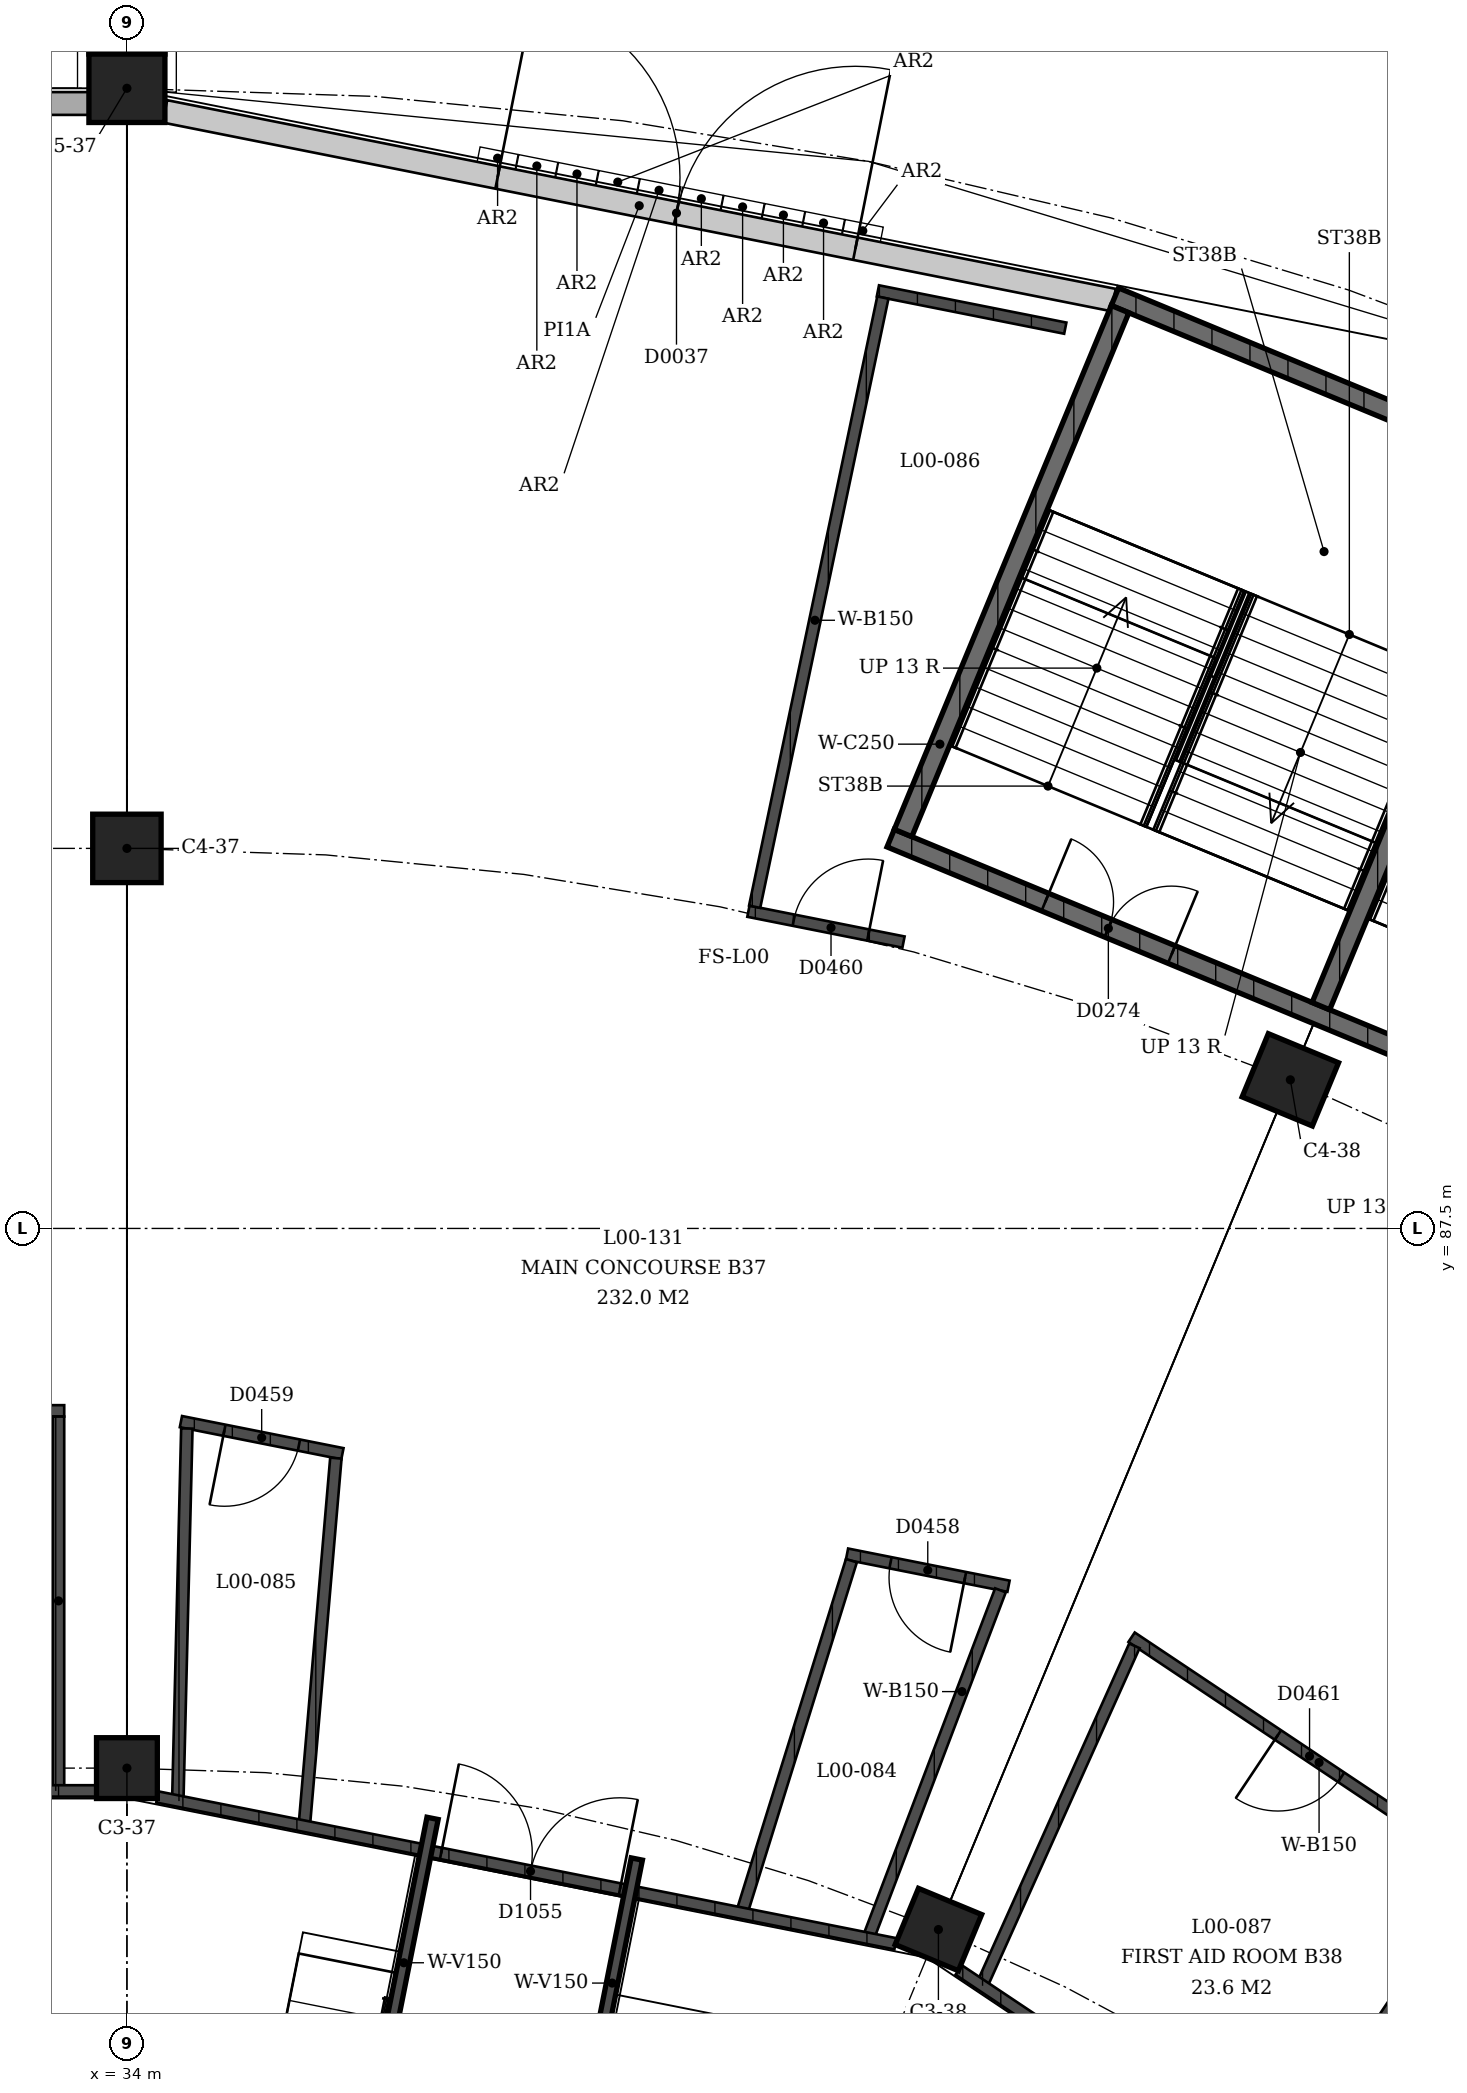
"""IFC4 building model, lengths in metres.
Left out: names, types, materials, properties, quantities, classifications, styles, units other than length and angle.
Written with IfcOpenShell. Run it as: python <this file> out.ifc"""

import sys

from ifc_helpers import new_model, si_unit, direction, frame, frame_2d, origin, origin_2d, place, context, subcontext, project, spatial, rectangle, extrude, element, fill, save


model = new_model("IFC4")
c1 = context("Model", 3, precision=1e-05, world=origin(), true_north=direction((0.0, 1.0)))
c2 = subcontext(c1, "Body", "Model", "MODEL_VIEW")
j1 = project(units=[si_unit("LENGTHUNIT", "METRE"), si_unit("PLANEANGLEUNIT", "RADIAN")], contexts=[c1])
p1 = place(None, origin())
s1 = spatial("IfcSite", under=j1, at=p1, CompositionType="ELEMENT")
p2 = place(p1, origin())
s2 = spatial("IfcBuilding", under=s1, at=p2, CompositionType="ELEMENT")
p3 = place(p2, origin())
s3 = spatial("IfcBuildingStorey", under=s2, at=p3, CompositionType="ELEMENT", Elevation=0.0)
p4 = place(p3, frame((34.0, 80.4, 0.0), z_axis=(0.0, 0.0, 1.0), x_axis=(-1.0, 0.0, 0.0)))
e1 = element("IfcColumn", 1, at=p4, inside=s3, PredefinedType="COLUMN", context=c2, shape_type="SweptSolid", body=[
    extrude(rectangle(XDim=0.8, YDim=0.8, at=origin_2d()), origin(), (0.0, 0.0, 1.0), 4.5),
])
p5 = place(p3, frame((34.0, 92.5, 0.0), z_axis=(0.0, 0.0, 1.0), x_axis=(-1.0, 0.0, 0.0)))
e2 = element("IfcColumn", 2, at=p5, inside=s3, PredefinedType="COLUMN", context=c2, shape_type="SweptSolid", body=[
    extrude(rectangle(XDim=0.9, YDim=0.9, at=origin_2d()), origin(), (0.0, 0.0, 1.0), 4.5),
])
p6 = place(p3, frame((34.0, 102.5, 0.0), z_axis=(0.0, 0.0, 1.0), x_axis=(-1.0, 0.0, 0.0)))
e3 = element("IfcColumn", 3, at=p6, inside=s3, PredefinedType="COLUMN", context=c2, shape_type="SweptSolid", body=[
    extrude(rectangle(XDim=1.0, YDim=0.9, at=origin_2d()), origin(), (0.0, 0.0, 1.0), 4.5),
])
p7 = place(p3, frame((44.677, 78.276, 0.0), z_axis=(0.0, 0.0, 1.0), x_axis=(-0.923879532511, 0.382683432365, 0.0)))
e4 = element("IfcColumn", 4, at=p7, inside=s3, PredefinedType="COLUMN", context=c2, shape_type="SweptSolid", body=[
    extrude(rectangle(XDim=0.9, YDim=0.8, at=origin_2d()), origin(), (0.0, 0.0, 1.0), 4.5),
])
p8 = place(p3, frame((49.307, 89.455, 0.0), z_axis=(0.0, 0.0, 1.0), x_axis=(-0.923879532511, 0.382683432365, 0.0)))
e5 = element("IfcColumn", 5, at=p8, inside=s3, PredefinedType="COLUMN", context=c2, shape_type="SweptSolid", body=[
    extrude(rectangle(XDim=1.0, YDim=0.9, at=origin_2d()), origin(), (0.0, 0.0, 1.0), 4.5),
])
p9 = place(p3, frame((21.0, 102.3, 0.0), z_axis=(0.0, 0.0, 1.0), x_axis=(1.0, 0.0, 0.0)))
e6 = element("IfcWall", 6, at=p9, inside=s3, PredefinedType="SOLIDWALL", context=c2, shape_type="SweptSolid", body=[
    extrude(rectangle(XDim=12.5, YDim=0.3, at=frame_2d((6.25, 0.0))), origin(), (0.0, 0.0, 1.0), 3.09),
])
p10 = place(p9, frame((7.238, 0.0, 0.0)))
e7 = element("IfcOpeningElement", 7, at=p10, cuts=e6, PredefinedType="OPENING", context=c2, shape_type="SweptSolid", body=[
    extrude(rectangle(XDim=3.0, YDim=2.4, at=frame_2d((1.5, 1.2))), frame((0.0, 0.16, 0.0), z_axis=(0.0, -1.0, 0.0), x_axis=(1.0, 0.0, 0.0)), (0.0, 0.0, 1.0), 0.32),
])
p11 = place(p3, frame((34.5, 102.197, 0.0), z_axis=(0.0, 0.0, 1.0), x_axis=(0.980785269235, -0.195090378163, 0.0)))
e8 = element("IfcWall", 8, at=p11, inside=s3, PredefinedType="SOLIDWALL", context=c2, shape_type="SweptSolid", body=[
    extrude(rectangle(XDim=12.726, YDim=0.3, at=frame_2d((6.363, 0.0))), origin(), (0.0, 0.0, 1.0), 2.79),
])
p12 = place(p11, frame((4.463, 0.0, 0.0)))
e9 = element("IfcOpeningElement", 9, at=p12, cuts=e8, PredefinedType="OPENING", context=c2, shape_type="SweptSolid", body=[
    extrude(rectangle(XDim=4.8, YDim=2.4, at=frame_2d((2.4, 1.2))), frame((0.0, 0.16, 0.0), z_axis=(0.0, -1.0, 0.0), x_axis=(1.0, 0.0, 0.0)), (0.0, 0.0, 1.0), 0.32),
])
p13 = place(p3, frame((55.274, 87.985, 0.0), z_axis=(0.0, 0.0, 1.0), x_axis=(-0.923877480578, 0.382688386133, 0.0)))
e10 = element("IfcWall", 10, at=p13, inside=s3, PredefinedType="SHEAR", context=c2, shape_type="SweptSolid", body=[
    extrude(rectangle(XDim=12.15, YDim=0.25, at=frame_2d((6.075, 0.0))), origin(), (0.0, 0.0, 1.0), 4.09),
])
p14 = place(p13, frame((2.2, 0.0, 0.0)))
e11 = element("IfcOpeningElement", 11, at=p14, cuts=e10, PredefinedType="OPENING", context=c2, shape_type="SweptSolid", body=[
    extrude(rectangle(XDim=1.8, YDim=2.1, at=frame_2d((0.9, 1.05))), frame((0.0, 0.125, 0.0), z_axis=(0.0, -1.0, 0.0), x_axis=(1.0, 0.0, 0.0)), (0.0, 0.0, 1.0), 0.25),
])
p15 = place(p13, frame((8.15, 0.0, 0.0)))
e12 = element("IfcOpeningElement", 12, at=p15, cuts=e10, PredefinedType="OPENING", context=c2, shape_type="SweptSolid", body=[
    extrude(rectangle(XDim=1.8, YDim=2.1, at=frame_2d((0.9, 1.05))), frame((0.0, 0.125, 0.0), z_axis=(0.0, -1.0, 0.0), x_axis=(1.0, 0.0, 0.0)), (0.0, 0.0, 1.0), 0.25),
])
p16 = place(p3, frame((58.224, 95.108, 0.0), z_axis=(0.0, 0.0, 1.0), x_axis=(-0.923884584817, 0.382671234792, 0.0)))
e13 = element("IfcWall", 13, at=p16, inside=s3, PredefinedType="SHEAR", context=c2, shape_type="SweptSolid", body=[
    extrude(rectangle(XDim=12.15, YDim=0.25, at=frame_2d((6.075, 0.0))), origin(), (0.0, 0.0, 1.0), 4.09),
])
p17 = place(p3, frame((44.212, 92.702, 0.0), z_axis=(0.0, 0.0, 1.0), x_axis=(0.382664910245, 0.923887204407, 0.0)))
e14 = element("IfcWall", 14, at=p17, inside=s3, PredefinedType="SHEAR", context=c2, shape_type="SweptSolid", body=[
    extrude(rectangle(XDim=7.46, YDim=0.25, at=frame_2d((3.73, 0.0))), origin(), (0.0, 0.0, 1.0), 4.09),
])
p18 = place(p3, frame((49.709, 90.425, 0.0), z_axis=(0.0, 0.0, 1.0), x_axis=(0.382676480483, 0.923882412044, 0.0)))
e15 = element("IfcWall", 15, at=p18, inside=s3, PredefinedType="SHEAR", context=c2, shape_type="SweptSolid", body=[
    extrude(rectangle(XDim=7.46, YDim=0.25, at=frame_2d((3.73, 0.0))), origin(), (0.0, 0.0, 1.0), 4.09),
])
p19 = place(p3, frame((29.525, 85.1, 0.0), z_axis=(0.0, 0.0, 1.0), x_axis=(1.0, 0.0, 0.0)))
e16 = element("IfcWall", 16, at=p19, inside=s3, PredefinedType="SOLIDWALL", context=c2, shape_type="SweptSolid", body=[
    extrude(rectangle(XDim=3.65, YDim=0.15, at=frame_2d((1.825, 0.0))), origin(), (0.0, 0.0, 1.0), 3.0),
])
p20 = place(p19, frame((1.325, 0.0, 0.0)))
e17 = element("IfcOpeningElement", 17, at=p20, cuts=e16, PredefinedType="OPENING", context=c2, shape_type="SweptSolid", body=[
    extrude(rectangle(XDim=1.0, YDim=2.1, at=frame_2d((0.5, 1.05))), frame((0.0, 0.075, 0.0), z_axis=(0.0, -1.0, 0.0), x_axis=(1.0, 0.0, 0.0)), (0.0, 0.0, 1.0), 0.15),
])
p21 = place(p3, frame((33.1, 80.1, 0.0), z_axis=(0.0, 0.0, 1.0), x_axis=(0.0, 1.0, 0.0)))
e18 = element("IfcWall", 18, at=p21, inside=s3, PredefinedType="SOLIDWALL", context=c2, shape_type="SweptSolid", body=[
    extrude(rectangle(XDim=4.925, YDim=0.15, at=frame_2d((2.462, 0.0))), origin(), (0.0, 0.0, 1.0), 3.0),
])
p22 = place(p3, frame((45.599, 82.793, 0.0), z_axis=(0.0, 0.0, 1.0), x_axis=(-0.980788176969, 0.195075759432, 0.0)))
e19 = element("IfcWall", 19, at=p22, inside=s3, PredefinedType="SOLIDWALL", context=c2, shape_type="SweptSolid", body=[
    extrude(rectangle(XDim=2.166, YDim=0.15, at=frame_2d((1.083, 0.0))), origin(), (0.0, 0.0, 1.0), 3.0),
])
p23 = place(p22, frame((0.583, 0.0, 0.0)))
e20 = element("IfcOpeningElement", 20, at=p23, cuts=e19, PredefinedType="OPENING", context=c2, shape_type="SweptSolid", body=[
    extrude(rectangle(XDim=1.0, YDim=2.1, at=frame_2d((0.5, 1.05))), frame((0.0, 0.075, 0.0), z_axis=(0.0, -1.0, 0.0), x_axis=(1.0, 0.0, 0.0)), (0.0, 0.0, 1.0), 0.15),
])
p24 = place(p3, frame((43.753, 78.16, 0.0), z_axis=(0.0, 0.0, 1.0), x_axis=(0.355265667312, 0.934765374642, 0.0)))
e21 = element("IfcWall", 21, at=p24, inside=s3, PredefinedType="SOLIDWALL", context=c2, shape_type="SweptSolid", body=[
    extrude(rectangle(XDim=4.898, YDim=0.15, at=frame_2d((2.449, 0.0))), origin(), (0.0, 0.0, 1.0), 3.0),
])
p25 = place(p3, frame((42.089, 78.491, 0.0), z_axis=(0.0, 0.0, 1.0), x_axis=(0.297150057793, 0.954830792944, 0.0)))
e22 = element("IfcWall", 22, at=p25, inside=s3, PredefinedType="SOLIDWALL", context=c2, shape_type="SweptSolid", body=[
    extrude(rectangle(XDim=4.857, YDim=0.15, at=frame_2d((2.429, 0.0))), origin(), (0.0, 0.0, 1.0), 3.0),
])
p26 = place(p3, frame((36.835, 84.536, 0.0), z_axis=(0.0, 0.0, 1.0), x_axis=(-0.980792464832, 0.19505419998, 0.0)))
e23 = element("IfcWall", 23, at=p26, inside=s3, PredefinedType="SOLIDWALL", context=c2, shape_type="SweptSolid", body=[
    extrude(rectangle(XDim=2.167, YDim=0.15, at=frame_2d((1.083, 0.0))), origin(), (0.0, 0.0, 1.0), 3.0),
])
p27 = place(p26, frame((0.583, 0.0, 0.0)))
e24 = element("IfcOpeningElement", 24, at=p27, cuts=e23, PredefinedType="OPENING", context=c2, shape_type="SweptSolid", body=[
    extrude(rectangle(XDim=1.0, YDim=2.1, at=frame_2d((0.5, 1.05))), frame((0.0, 0.075, 0.0), z_axis=(0.0, -1.0, 0.0), x_axis=(1.0, 0.0, 0.0)), (0.0, 0.0, 1.0), 0.15),
])
p28 = place(p3, frame((36.333, 79.636, 0.0), z_axis=(0.0, 0.0, 1.0), x_axis=(0.085651910167, 0.996325122781, 0.0)))
e25 = element("IfcWall", 25, at=p28, inside=s3, PredefinedType="SOLIDWALL", context=c2, shape_type="SweptSolid", body=[
    extrude(rectangle(XDim=4.86, YDim=0.15, at=frame_2d((2.43, 0.0))), origin(), (0.0, 0.0, 1.0), 3.0),
])
p29 = place(p3, frame((34.669, 79.967, 0.0), z_axis=(0.0, 0.0, 1.0), x_axis=(0.024351431726, 0.999703459918, 0.0)))
e26 = element("IfcWall", 26, at=p29, inside=s3, PredefinedType="SOLIDWALL", context=c2, shape_type="SweptSolid", body=[
    extrude(rectangle(XDim=4.903, YDim=0.15, at=frame_2d((2.451, 0.0))), origin(), (0.0, 0.0, 1.0), 3.0),
])
p30 = place(p3, frame((44.217, 91.268, 0.0), z_axis=(0.0, 0.0, 1.0), x_axis=(-0.980769797582, 0.195168143279, 0.0)))
e27 = element("IfcWall", 27, at=p30, inside=s3, PredefinedType="SOLIDWALL", context=c2, shape_type="SweptSolid", body=[
    extrude(rectangle(XDim=2.08, YDim=0.15, at=frame_2d((1.04, 0.0))), origin(), (0.0, 0.0, 1.0), 3.0),
])
p31 = place(p30, frame((0.472, 0.0, 0.0)))
e28 = element("IfcOpeningElement", 28, at=p31, cuts=e27, PredefinedType="OPENING", context=c2, shape_type="SweptSolid", body=[
    extrude(rectangle(XDim=1.0, YDim=2.1, at=frame_2d((0.5, 1.05))), frame((0.0, 0.075, 0.0), z_axis=(0.0, -1.0, 0.0), x_axis=(1.0, 0.0, 0.0)), (0.0, 0.0, 1.0), 0.15),
])
p32 = place(p3, frame((46.346, 99.344, 0.0), z_axis=(0.0, 0.0, 1.0), x_axis=(-0.980778163577, 0.195126097309, 0.0)))
e29 = element("IfcWall", 29, at=p32, inside=s3, PredefinedType="SOLIDWALL", context=c2, shape_type="SweptSolid", body=[
    extrude(rectangle(XDim=2.514, YDim=0.15, at=frame_2d((1.257, 0.0))), origin(), (0.0, 0.0, 1.0), 3.0),
])
p33 = place(p3, frame((42.259, 91.732, 0.0), z_axis=(0.0, 0.0, 1.0), x_axis=(0.206011983374, 0.978549468707, 0.0)))
e30 = element("IfcWall", 30, at=p33, inside=s3, PredefinedType="SOLIDWALL", context=c2, shape_type="SweptSolid", body=[
    extrude(rectangle(XDim=8.19, YDim=0.15, at=frame_2d((4.095, 0.0))), origin(), (0.0, 0.0, 1.0), 3.0),
])
p34 = place(p3, frame((47.219, 82.122, 0.0), z_axis=(0.0, 0.0, 1.0), x_axis=(0.831461141198, -0.555582910715, 0.0)))
e31 = element("IfcWall", 31, at=p34, inside=s3, PredefinedType="SOLIDWALL", context=c2, shape_type="SweptSolid", body=[
    extrude(rectangle(XDim=11.102, YDim=0.15, at=frame_2d((5.551, 0.0))), origin(), (0.0, 0.0, 1.0), 3.0),
])
p35 = place(p34, frame((2.316, 0.0, 0.0)))
e32 = element("IfcOpeningElement", 32, at=p35, cuts=e31, PredefinedType="OPENING", context=c2, shape_type="SweptSolid", body=[
    extrude(rectangle(XDim=1.0, YDim=2.1, at=frame_2d((0.5, 1.05))), frame((0.0, 0.075, 0.0), z_axis=(0.0, -1.0, 0.0), x_axis=(1.0, 0.0, 0.0)), (0.0, 0.0, 1.0), 0.15),
])
p36 = place(p34, frame((7.786, 0.0, 0.0)))
e33 = element("IfcOpeningElement", 33, at=p36, cuts=e31, PredefinedType="OPENING", context=c2, shape_type="SweptSolid", body=[
    extrude(rectangle(XDim=1.0, YDim=2.1, at=frame_2d((0.5, 1.05))), frame((0.0, 0.075, 0.0), z_axis=(0.0, -1.0, 0.0), x_axis=(1.0, 0.0, 0.0)), (0.0, 0.0, 1.0), 0.15),
])
p37 = place(p3, frame((45.248, 77.541, 0.0), z_axis=(0.0, 0.0, 1.0), x_axis=(0.409747004505, 0.912199206478, 0.0)))
e34 = element("IfcWall", 34, at=p37, inside=s3, PredefinedType="SOLIDWALL", context=c2, shape_type="SweptSolid", body=[
    extrude(rectangle(XDim=4.898, YDim=0.15, at=frame_2d((2.449, 0.0))), origin(), (0.0, 0.0, 1.0), 3.0),
])
p38 = place(p3, frame((49.099, 74.968, 0.0), z_axis=(0.0, 0.0, 1.0), x_axis=(0.557740720303, 0.830015234147, 0.0)))
e35 = element("IfcWall", 35, at=p38, inside=s3, PredefinedType="SOLIDWALL", context=c2, shape_type="SweptSolid", body=[
    extrude(rectangle(XDim=4.83, YDim=0.15, at=frame_2d((2.415, 0.0))), origin(), (0.0, 0.0, 1.0), 3.0),
])
p39 = place(p3, frame((20.9, 80.1, 0.0), z_axis=(0.0, 0.0, 1.0), x_axis=(1.0, 0.0, 0.0)))
e36 = element("IfcWall", 36, at=p39, inside=s3, PredefinedType="SOLIDWALL", context=c2, shape_type="SweptSolid", body=[
    extrude(rectangle(XDim=12.7, YDim=0.15, at=frame_2d((6.35, 0.0))), origin(), (0.0, 0.0, 1.0), 3.0),
])
p40 = place(p3, frame((34.4, 80.021, 0.0), z_axis=(0.0, 0.0, 1.0), x_axis=(0.980784963798, -0.195091913691, 0.0)))
e37 = element("IfcWall", 37, at=p40, inside=s3, PredefinedType="SOLIDWALL", context=c2, shape_type="SweptSolid", body=[
    extrude(rectangle(XDim=9.902, YDim=0.15, at=frame_2d((4.951, 0.0))), origin(), (0.0, 0.0, 1.0), 3.0),
])
p41 = place(p40, frame((3.806, 0.0, 0.0)))
e38 = element("IfcOpeningElement", 38, at=p41, cuts=e37, PredefinedType="OPENING", context=c2, shape_type="SweptSolid", body=[
    extrude(rectangle(XDim=2.4, YDim=2.4, at=frame_2d((1.2, 1.2))), frame((0.0, 0.075, 0.0), z_axis=(0.0, -1.0, 0.0), x_axis=(1.0, 0.0, 0.0)), (0.0, 0.0, 1.0), 0.15),
])
p42 = place(p3, frame((44.944, 77.744, 0.0), z_axis=(0.0, 0.0, 1.0), x_axis=(0.83147031613, -0.555569179667, 0.0)))
e39 = element("IfcWall", 39, at=p42, inside=s3, PredefinedType="SOLIDWALL", context=c2, shape_type="SweptSolid", body=[
    extrude(rectangle(XDim=9.851, YDim=0.15, at=frame_2d((4.926, 0.0))), origin(), (0.0, 0.0, 1.0), 3.0),
])
for number, where, z_axis, x_axis in (
    (40, (39.792, 74.595, 0.0), (0.0, 0.0, 1.0), (0.195, 0.981, 0.0)),
    (41, (37.104, 75.129, 0.0), (0.0, 0.0, 1.0), (0.195, 0.981, 0.0)),
):
    element("IfcWall", number, at=place(p3, frame(where, z_axis=z_axis, x_axis=x_axis)), inside=s3, PredefinedType="SOLIDWALL", context=c2, shape_type="SweptSolid", body=[
        extrude(rectangle(XDim=4.7, YDim=0.15, at=frame_2d((2.35, 0.0))), origin(), (0.0, 0.0, 1.0), 2.75),
    ])
p43 = place(p12, origin())
e42 = element("IfcDoor", 42, at=p43, inside=s3, OperationType="DOUBLE_DOOR_SINGLE_SWING", PredefinedType="DOOR", context=c2, shape_type="SweptSolid", body=[
    extrude(rectangle(XDim=4.8, YDim=2.4, at=frame_2d((2.4, 1.2))), frame((0.0, 0.025, 0.0), z_axis=(0.0, -1.0, 0.0), x_axis=(1.0, 0.0, 0.0)), (0.0, 0.0, 1.0), 0.05),
])
fill(e9, e42)
p44 = place(p15, origin())
e43 = element("IfcDoor", 43, at=p44, inside=s3, OperationType="DOUBLE_DOOR_SINGLE_SWING", PredefinedType="DOOR", context=c2, shape_type="SweptSolid", body=[
    extrude(rectangle(XDim=1.8, YDim=2.1, at=frame_2d((0.9, 1.05))), frame((0.0, 0.025, 0.0), z_axis=(0.0, -1.0, 0.0), x_axis=(1.0, 0.0, 0.0)), (0.0, 0.0, 1.0), 0.05),
])
fill(e12, e43)
p45 = place(p23, origin())
e44 = element("IfcDoor", 44, at=p45, inside=s3, OperationType="SINGLE_SWING_RIGHT", PredefinedType="DOOR", context=c2, shape_type="SweptSolid", body=[
    extrude(rectangle(XDim=1.0, YDim=2.1, at=frame_2d((0.5, 1.05))), frame((0.0, 0.025, 0.0), z_axis=(0.0, -1.0, 0.0), x_axis=(1.0, 0.0, 0.0)), (0.0, 0.0, 1.0), 0.05),
])
fill(e20, e44)
p46 = place(p27, origin())
e45 = element("IfcDoor", 45, at=p46, inside=s3, OperationType="SINGLE_SWING_LEFT", PredefinedType="DOOR", context=c2, shape_type="SweptSolid", body=[
    extrude(rectangle(XDim=1.0, YDim=2.1, at=frame_2d((0.5, 1.05))), frame((0.0, 0.025, 0.0), z_axis=(0.0, -1.0, 0.0), x_axis=(1.0, 0.0, 0.0)), (0.0, 0.0, 1.0), 0.05),
])
fill(e24, e45)
p47 = place(p31, origin())
e46 = element("IfcDoor", 46, at=p47, inside=s3, OperationType="SINGLE_SWING_LEFT", PredefinedType="DOOR", context=c2, shape_type="SweptSolid", body=[
    extrude(rectangle(XDim=1.0, YDim=2.1, at=frame_2d((0.5, 1.05))), frame((0.0, 0.025, 0.0), z_axis=(0.0, -1.0, 0.0), x_axis=(1.0, 0.0, 0.0)), (0.0, 0.0, 1.0), 0.05),
])
fill(e28, e46)
p48 = place(p35, origin())
e47 = element("IfcDoor", 47, at=p48, inside=s3, OperationType="SINGLE_SWING_LEFT", PredefinedType="DOOR", context=c2, shape_type="SweptSolid", body=[
    extrude(rectangle(XDim=1.0, YDim=2.1, at=frame_2d((0.5, 1.05))), frame((0.0, 0.025, 0.0), z_axis=(0.0, -1.0, 0.0), x_axis=(1.0, 0.0, 0.0)), (0.0, 0.0, 1.0), 0.05),
])
fill(e32, e47)
p49 = place(p41, origin())
e48 = element("IfcDoor", 48, at=p49, inside=s3, OperationType="DOUBLE_DOOR_SINGLE_SWING", PredefinedType="DOOR", context=c2, shape_type="SweptSolid", body=[
    extrude(rectangle(XDim=2.4, YDim=2.4, at=frame_2d((1.2, 1.2))), frame((0.0, 0.025, 0.0), z_axis=(0.0, -1.0, 0.0), x_axis=(1.0, 0.0, 0.0)), (0.0, 0.0, 1.0), 0.05),
])
fill(e38, e48)
save(model, sys.argv[1])
